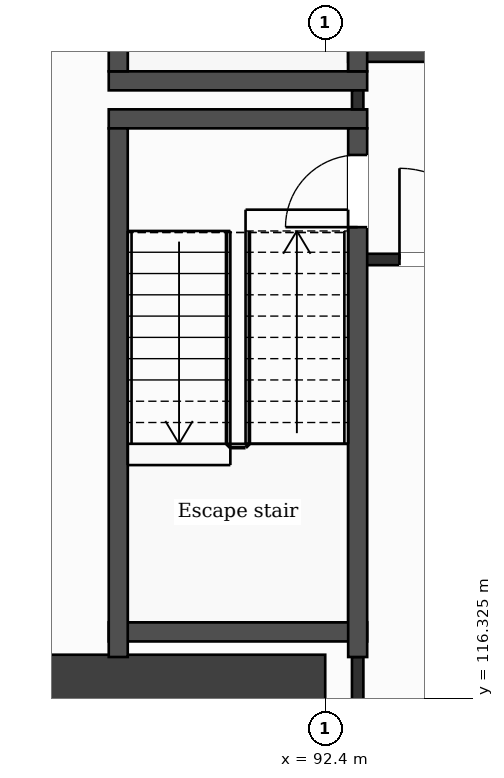
"""IFC4 building model, lengths in metres.
Left out: names, types, materials, properties, quantities, classifications, styles, units other than length and angle.
Written with IfcOpenShell. Run it as: python <this file> out.ifc"""

import sys

from ifc_helpers import new_model, si_unit, direction, frame, frame_2d, origin, place, context, subcontext, project, spatial, rectangle, extrude, element, fill, save


model = new_model("IFC4")
c1 = context("Model", 3, precision=1e-05, world=origin(), true_north=direction((0.0, 1.0)))
c2 = subcontext(c1, "Body", "Model", "MODEL_VIEW")
j1 = project(units=[si_unit("LENGTHUNIT", "METRE"), si_unit("PLANEANGLEUNIT", "RADIAN")], contexts=[c1])
p1 = place(None, origin())
s1 = spatial("IfcSite", under=j1, at=p1, CompositionType="ELEMENT")
p2 = place(p1, origin())
s2 = spatial("IfcBuilding", under=s1, at=p2, CompositionType="ELEMENT")
p3 = place(p2, frame((0.0, 0.0, 184.8)))
s3 = spatial("IfcBuildingStorey", under=s2, at=p3, CompositionType="ELEMENT", Elevation=184.8)
p4 = place(p3, frame((86.184, 110.85, 0.0), z_axis=(0.0, 0.0, 1.0), x_axis=(0.133410495943, 0.991060865725, 0.0)))
e1 = element("IfcWall", 1, at=p4, inside=s3, PredefinedType="SHEAR", context=c2, shape_type="SweptSolid", body=[
    extrude(rectangle(XDim=21.29, YDim=0.9, at=frame_2d((10.645, 0.0))), origin(), (0.0, 0.0, 1.0), 3.7),
])
p5 = place(p3, frame((87.323, 116.45, 0.0), z_axis=(0.0, 0.0, 1.0), x_axis=(1.0, 0.0, 0.0)))
e2 = element("IfcWall", 2, at=p5, inside=s3, PredefinedType="SHEAR", context=c2, shape_type="SweptSolid", body=[
    extrude(rectangle(XDim=5.077, YDim=0.9, at=frame_2d((2.539, 0.0))), origin(), (0.0, 0.0, 1.0), 3.7),
])
p6 = place(p3, frame((89.552, 117.2, 0.0), z_axis=(0.0, 0.0, 1.0), x_axis=(1.0, 0.0, 0.0)))
e3 = element("IfcWall", 3, at=p6, inside=s3, PredefinedType="PARTITIONING", context=c2, shape_type="SweptSolid", body=[
    extrude(rectangle(XDim=3.4, YDim=0.25, at=frame_2d((1.7, 0.0))), origin(), (0.0, 0.0, 1.0), 3.38),
])
p7 = place(p3, frame((92.827, 122.1, 0.0), z_axis=(0.0, 0.0, 1.0), x_axis=(1.0, 0.0, 0.0)))
e4 = element("IfcWall", 4, at=p7, inside=s3, PredefinedType="PARTITIONING", context=c2, shape_type="SweptSolid", body=[
    extrude(rectangle(XDim=2.4, YDim=0.15, at=frame_2d((1.2, 0.0))), origin(), (0.0, 0.0, 1.0), 3.38),
])
p8 = place(p7, frame((0.55, 0.0, 0.0)))
e5 = element("IfcOpeningElement", 5, at=p8, cuts=e4, PredefinedType="OPENING", context=c2, shape_type="SweptSolid", body=[
    extrude(rectangle(XDim=1.2, YDim=2.1, at=frame_2d((0.6, 1.05))), frame((0.0, 0.085, 0.0), z_axis=(0.0, -1.0, 0.0), x_axis=(1.0, 0.0, 0.0)), (0.0, 0.0, 1.0), 0.17),
])
for number, where, z_axis, x_axis in (
    (6, (89.552, 123.95, 0.0), (0.0, 0.0, 1.0), (1.0, 0.0, 0.0)),
    (7, (89.552, 124.45, 0.0), (0.0, 0.0, 1.0), (1.0, 0.0, 0.0)),
):
    element("IfcWall", number, at=place(p3, frame(where, z_axis=z_axis, x_axis=x_axis)), inside=s3, PredefinedType="PARTITIONING", context=c2, shape_type="SweptSolid", body=[
        extrude(rectangle(XDim=3.4, YDim=0.25, at=frame_2d((1.7, 0.0))), origin(), (0.0, 0.0, 1.0), 3.38),
    ])
p9 = place(p3, frame((92.702, 124.8, 0.0), z_axis=(0.0, 0.0, 1.0), x_axis=(1.0, 0.0, 0.0)))
e8 = element("IfcWall", 8, at=p9, inside=s3, PredefinedType="PARTITIONING", context=c2, shape_type="SweptSolid", body=[
    extrude(rectangle(XDim=7.198, YDim=0.2, at=frame_2d((3.599, 0.0))), origin(), (0.0, 0.0, 1.0), 3.38),
])
p10 = place(p9, frame((5.609, 0.0, 0.0)))
e9 = element("IfcOpeningElement", 9, at=p10, cuts=e8, PredefinedType="OPENING", context=c2, shape_type="SweptSolid", body=[
    extrude(rectangle(XDim=1.1, YDim=2.1, at=frame_2d((0.55, 1.05))), frame((0.0, 0.11, 0.0), z_axis=(0.0, -1.0, 0.0), x_axis=(1.0, 0.0, 0.0)), (0.0, 0.0, 1.0), 0.22),
])
p11 = place(p3, frame((89.677, 116.87, 0.0), z_axis=(0.0, 0.0, 1.0), x_axis=(0.0, 1.0, 0.0)))
e10 = element("IfcWall", 10, at=p11, inside=s3, PredefinedType="PARTITIONING", context=c2, shape_type="SweptSolid", body=[
    extrude(rectangle(XDim=6.955, YDim=0.25, at=frame_2d((3.478, 0.0))), origin(), (0.0, 0.0, 1.0), 3.38),
])
p12 = place(p3, frame((89.677, 124.575, 0.0), z_axis=(0.0, 0.0, 1.0), x_axis=(0.0, 1.0, 0.0)))
e11 = element("IfcWall", 11, at=p12, inside=s3, PredefinedType="PARTITIONING", context=c2, shape_type="SweptSolid", body=[
    extrude(rectangle(XDim=6.955, YDim=0.25, at=frame_2d((3.478, 0.0))), origin(), (0.0, 0.0, 1.0), 3.38),
])
p13 = place(p3, frame((92.827, 116.0, 0.0), z_axis=(0.0, 0.0, 1.0), x_axis=(0.0, 1.0, 0.0)))
e12 = element("IfcWall", 12, at=p13, inside=s3, PredefinedType="PARTITIONING", context=c2, shape_type="SweptSolid", body=[
    extrude(rectangle(XDim=0.87, YDim=0.15, at=frame_2d((0.435, 0.0))), origin(), (0.0, 0.0, 1.0), 3.38),
])
p14 = place(p3, frame((92.827, 124.075, 0.0), z_axis=(0.0, 0.0, 1.0), x_axis=(0.0, 1.0, 0.0)))
e13 = element("IfcWall", 13, at=p14, inside=s3, PredefinedType="PARTITIONING", context=c2, shape_type="SweptSolid", body=[
    extrude(rectangle(XDim=0.25, YDim=0.15, at=frame_2d((0.125, 0.0))), origin(), (0.0, 0.0, 1.0), 3.38),
])
p15 = place(p3, frame((92.827, 116.87, 0.0), z_axis=(0.0, 0.0, 1.0), x_axis=(0.0, 1.0, 0.0)))
e14 = element("IfcWall", 14, at=p15, inside=s3, PredefinedType="PARTITIONING", context=c2, shape_type="SweptSolid", body=[
    extrude(rectangle(XDim=6.955, YDim=0.25, at=frame_2d((3.478, 0.0))), origin(), (0.0, 0.0, 1.0), 3.38),
])
p16 = place(p15, frame((5.655, 0.0, 0.0)))
e15 = element("IfcOpeningElement", 15, at=p16, cuts=e14, PredefinedType="OPENING", context=c2, shape_type="SweptSolid", body=[
    extrude(rectangle(XDim=0.95, YDim=2.1, at=frame_2d((0.475, 1.05))), frame((0.0, 0.135, 0.0), z_axis=(0.0, -1.0, 0.0), x_axis=(1.0, 0.0, 0.0)), (0.0, 0.0, 1.0), 0.27),
])
p17 = place(p3, frame((92.827, 124.575, 0.0), z_axis=(0.0, 0.0, 1.0), x_axis=(0.0, 1.0, 0.0)))
e16 = element("IfcWall", 16, at=p17, inside=s3, PredefinedType="PARTITIONING", context=c2, shape_type="SweptSolid", body=[
    extrude(rectangle(XDim=6.955, YDim=0.25, at=frame_2d((3.478, 0.0))), origin(), (0.0, 0.0, 1.0), 3.38),
])
p18 = place(p17, frame((5.325, 0.0, 0.0)))
e17 = element("IfcOpeningElement", 17, at=p18, cuts=e16, PredefinedType="OPENING", context=c2, shape_type="SweptSolid", body=[
    extrude(rectangle(XDim=1.0, YDim=2.1, at=frame_2d((0.5, 1.05))), frame((0.0, 0.135, 0.0), z_axis=(0.0, -1.0, 0.0), x_axis=(1.0, 0.0, 0.0)), (0.0, 0.0, 1.0), 0.27),
])
p19 = place(p8, origin())
e18 = element("IfcDoor", 18, at=p19, inside=s3, OperationType="SINGLE_SWING_LEFT", PredefinedType="DOOR", context=c2, shape_type="SweptSolid", body=[
    extrude(rectangle(XDim=1.2, YDim=2.1, at=frame_2d((0.6, 1.05))), frame((0.0, 0.025, 0.0), z_axis=(0.0, -1.0, 0.0), x_axis=(1.0, 0.0, 0.0)), (0.0, 0.0, 1.0), 0.05),
])
fill(e5, e18)
p20 = place(p16, origin())
e19 = element("IfcDoor", 19, at=p20, inside=s3, OperationType="SINGLE_SWING_LEFT", PredefinedType="DOOR", context=c2, shape_type="SweptSolid", body=[
    extrude(rectangle(XDim=0.95, YDim=2.1, at=frame_2d((0.475, 1.05))), frame((0.0, 0.025, 0.0), z_axis=(0.0, -1.0, 0.0), x_axis=(1.0, 0.0, 0.0)), (0.0, 0.0, 1.0), 0.05),
])
fill(e15, e19)
save(model, sys.argv[1])
